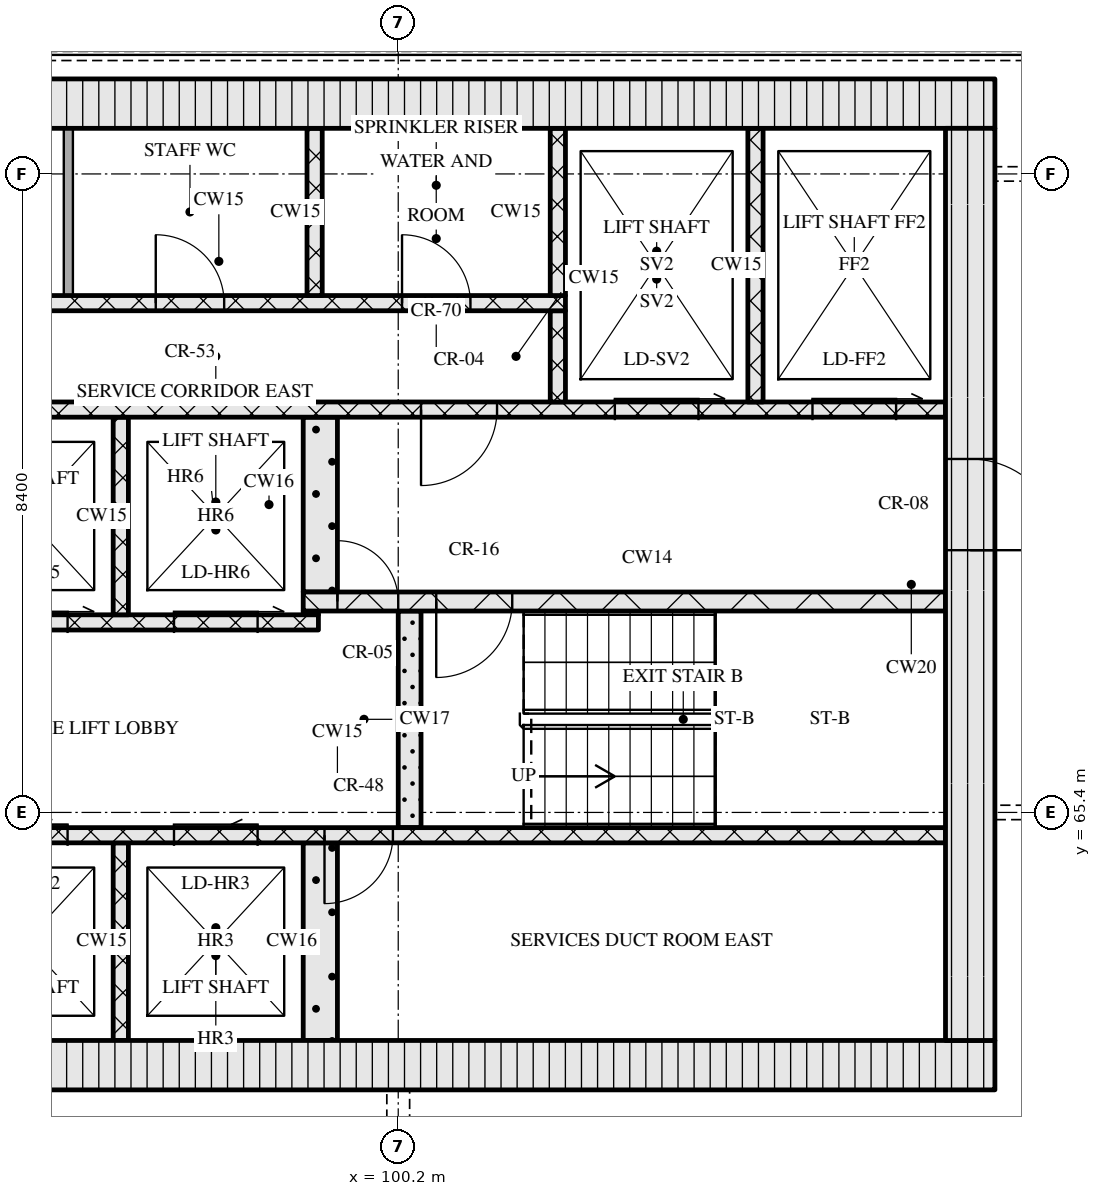
"""IFC4 building model, lengths in metres.
Left out: names, types, materials, properties, quantities, classifications, styles, units other than length and angle.
Written with IfcOpenShell. Run it as: python <this file> out.ifc"""

import sys

from ifc_helpers import new_model, si_unit, direction, frame, frame_2d, origin, place, context, subcontext, project, spatial, rectangle, extrude, element, fill, save


model = new_model("IFC4")
c1 = context("Model", 3, precision=1e-05, world=origin(), true_north=direction((0.0, 1.0)))
c2 = subcontext(c1, "Body", "Model", "MODEL_VIEW")
j1 = project(units=[si_unit("LENGTHUNIT", "METRE"), si_unit("PLANEANGLEUNIT", "RADIAN")], contexts=[c1])
p1 = place(None, origin())
s1 = spatial("IfcSite", under=j1, at=p1, CompositionType="ELEMENT")
p2 = place(p1, origin())
s2 = spatial("IfcBuilding", under=s1, at=p2, CompositionType="ELEMENT")
p3 = place(p2, frame((0.0, 0.0, 209.1)))
s3 = spatial("IfcBuildingStorey", under=s2, at=p3, CompositionType="ELEMENT", Elevation=209.1)
p4 = place(p3, frame((67.15, 62.075, 0.0), z_axis=(0.0, 0.0, 1.0), x_axis=(1.0, 0.0, 0.0)))
e1 = element("IfcWall", 1, at=p4, inside=s3, PredefinedType="SOLIDWALL", context=c2, shape_type="SweptSolid", body=[
    extrude(rectangle(XDim=40.9, YDim=0.65, at=frame_2d((20.45, 0.0))), origin(), (0.0, 0.0, 1.0), 3.32),
])
p5 = place(p4, frame((20.8, 0.0, 0.0)))
e2 = element("IfcOpeningElement", 2, at=p5, cuts=e1, PredefinedType="OPENING", context=c2, shape_type="SweptSolid", body=[
    extrude(rectangle(XDim=1.8, YDim=2.1, at=frame_2d((0.9, 1.05))), frame((0.0, 0.335, 0.0), z_axis=(0.0, -1.0, 0.0), x_axis=(1.0, 0.0, 0.0)), (0.0, 0.0, 1.0), 0.67),
])
p6 = place(p3, frame((67.15, 74.725, 0.0), z_axis=(0.0, 0.0, 1.0), x_axis=(1.0, 0.0, 0.0)))
e3 = element("IfcWall", 3, at=p6, inside=s3, PredefinedType="SOLIDWALL", context=c2, shape_type="SweptSolid", body=[
    extrude(rectangle(XDim=40.9, YDim=0.65, at=frame_2d((20.45, 0.0))), origin(), (0.0, 0.0, 1.0), 3.32),
])
p7 = place(p3, frame((107.725, 62.4, 0.0), z_axis=(0.0, 0.0, 1.0), x_axis=(0.0, 1.0, 0.0)))
e4 = element("IfcWall", 4, at=p7, inside=s3, PredefinedType="SOLIDWALL", context=c2, shape_type="SweptSolid", body=[
    extrude(rectangle(XDim=12.0, YDim=0.65, at=frame_2d((6.0, 0.0))), origin(), (0.0, 0.0, 1.0), 3.32),
])
p8 = place(p7, frame((6.45, 0.0, 0.0)))
e5 = element("IfcOpeningElement", 5, at=p8, cuts=e4, PredefinedType="OPENING", context=c2, shape_type="SweptSolid", body=[
    extrude(rectangle(XDim=1.2, YDim=2.1, at=frame_2d((0.6, 1.05))), frame((0.0, 0.335, 0.0), z_axis=(0.0, -1.0, 0.0), x_axis=(1.0, 0.0, 0.0)), (0.0, 0.0, 1.0), 0.67),
])
p9 = place(p3, frame((96.55, 62.4, 0.0), z_axis=(0.0, 0.0, 1.0), x_axis=(0.0, 1.0, 0.0)))
e6 = element("IfcWall", 6, at=p9, inside=s3, PredefinedType="SOLIDWALL", context=c2, shape_type="SweptSolid", body=[
    extrude(rectangle(XDim=2.6, YDim=0.2, at=frame_2d((1.3, 0.0))), origin(), (0.0, 0.0, 1.0), 3.32),
])
p10 = place(p3, frame((99.175, 62.4, 0.0), z_axis=(0.0, 0.0, 1.0), x_axis=(0.0, 1.0, 0.0)))
e7 = element("IfcWall", 7, at=p10, inside=s3, PredefinedType="SOLIDWALL", context=c2, shape_type="SweptSolid", body=[
    extrude(rectangle(XDim=2.6, YDim=0.45, at=frame_2d((1.3, 0.0))), origin(), (0.0, 0.0, 1.0), 3.32),
])
p11 = place(p3, frame((91.4, 65.1, 0.0), z_axis=(0.0, 0.0, 1.0), x_axis=(1.0, 0.0, 0.0)))
e8 = element("IfcWall", 8, at=p11, inside=s3, PredefinedType="SOLIDWALL", context=c2, shape_type="SweptSolid", body=[
    extrude(rectangle(XDim=16.0, YDim=0.2, at=frame_2d((8.0, 0.0))), origin(), (0.0, 0.0, 1.0), 3.32),
])
p12 = place(p11, frame((0.85, 0.0, 0.0)))
e9 = element("IfcOpeningElement", 9, at=p12, cuts=e8, PredefinedType="OPENING", context=c2, shape_type="SweptSolid", body=[
    extrude(rectangle(XDim=1.1, YDim=2.1, at=frame_2d((0.55, 1.05))), frame((0.0, 0.11, 0.0), z_axis=(0.0, -1.0, 0.0), x_axis=(1.0, 0.0, 0.0)), (0.0, 0.0, 1.0), 0.22),
])
p13 = place(p11, frame((3.35, 0.0, 0.0)))
e10 = element("IfcOpeningElement", 10, at=p13, cuts=e8, PredefinedType="OPENING", context=c2, shape_type="SweptSolid", body=[
    extrude(rectangle(XDim=1.1, YDim=2.1, at=frame_2d((0.55, 1.05))), frame((0.0, 0.11, 0.0), z_axis=(0.0, -1.0, 0.0), x_axis=(1.0, 0.0, 0.0)), (0.0, 0.0, 1.0), 0.22),
])
p14 = place(p11, frame((5.85, 0.0, 0.0)))
e11 = element("IfcOpeningElement", 11, at=p14, cuts=e8, PredefinedType="OPENING", context=c2, shape_type="SweptSolid", body=[
    extrude(rectangle(XDim=1.1, YDim=2.1, at=frame_2d((0.55, 1.05))), frame((0.0, 0.11, 0.0), z_axis=(0.0, -1.0, 0.0), x_axis=(1.0, 0.0, 0.0)), (0.0, 0.0, 1.0), 0.22),
])
p15 = place(p11, frame((7.83, 0.0, 0.0)))
e12 = element("IfcOpeningElement", 12, at=p15, cuts=e8, PredefinedType="OPENING", context=c2, shape_type="SweptSolid", body=[
    extrude(rectangle(XDim=0.9, YDim=2.1, at=frame_2d((0.45, 1.05))), frame((0.0, 0.11, 0.0), z_axis=(0.0, -1.0, 0.0), x_axis=(1.0, 0.0, 0.0)), (0.0, 0.0, 1.0), 0.22),
])
p16 = place(p3, frame((100.35, 65.2, 0.0), z_axis=(0.0, 0.0, 1.0), x_axis=(0.0, 1.0, 0.0)))
e13 = element("IfcWall", 13, at=p16, inside=s3, PredefinedType="SOLIDWALL", context=c2, shape_type="SweptSolid", body=[
    extrude(rectangle(XDim=2.85, YDim=0.3, at=frame_2d((1.425, 0.0))), origin(), (0.0, 0.0, 1.0), 3.32),
])
p17 = place(p3, frame((76.05, 67.9, 0.0), z_axis=(0.0, 0.0, 1.0), x_axis=(1.0, 0.0, 0.0)))
e14 = element("IfcWall", 14, at=p17, inside=s3, PredefinedType="SOLIDWALL", context=c2, shape_type="SweptSolid", body=[
    extrude(rectangle(XDim=23.1, YDim=0.2, at=frame_2d((11.55, 0.0))), origin(), (0.0, 0.0, 1.0), 3.32),
])
p18 = place(p17, frame((1.4, 0.0, 0.0)))
e15 = element("IfcOpeningElement", 15, at=p18, cuts=e14, PredefinedType="OPENING", context=c2, shape_type="SweptSolid", body=[
    extrude(rectangle(XDim=0.9, YDim=2.1, at=frame_2d((0.45, 1.05))), frame((0.0, 0.11, 0.0), z_axis=(0.0, -1.0, 0.0), x_axis=(1.0, 0.0, 0.0)), (0.0, 0.0, 1.0), 0.22),
])
p19 = place(p17, frame((5.11, 0.0, 0.0)))
e16 = element("IfcOpeningElement", 16, at=p19, cuts=e14, PredefinedType="OPENING", context=c2, shape_type="SweptSolid", body=[
    extrude(rectangle(XDim=0.9, YDim=2.1, at=frame_2d((0.45, 1.05))), frame((0.0, 0.11, 0.0), z_axis=(0.0, -1.0, 0.0), x_axis=(1.0, 0.0, 0.0)), (0.0, 0.0, 1.0), 0.22),
])
p20 = place(p17, frame((8.45, 0.0, 0.0)))
e17 = element("IfcOpeningElement", 17, at=p20, cuts=e14, PredefinedType="OPENING", context=c2, shape_type="SweptSolid", body=[
    extrude(rectangle(XDim=0.9, YDim=2.1, at=frame_2d((0.45, 1.05))), frame((0.0, 0.11, 0.0), z_axis=(0.0, -1.0, 0.0), x_axis=(1.0, 0.0, 0.0)), (0.0, 0.0, 1.0), 0.22),
])
p21 = place(p17, frame((10.91, 0.0, 0.0)))
e18 = element("IfcOpeningElement", 18, at=p21, cuts=e14, PredefinedType="OPENING", context=c2, shape_type="SweptSolid", body=[
    extrude(rectangle(XDim=0.9, YDim=2.1, at=frame_2d((0.45, 1.05))), frame((0.0, 0.11, 0.0), z_axis=(0.0, -1.0, 0.0), x_axis=(1.0, 0.0, 0.0)), (0.0, 0.0, 1.0), 0.22),
])
p22 = place(p17, frame((13.55, 0.0, 0.0)))
e19 = element("IfcOpeningElement", 19, at=p22, cuts=e14, PredefinedType="OPENING", context=c2, shape_type="SweptSolid", body=[
    extrude(rectangle(XDim=1.0, YDim=2.1, at=frame_2d((0.5, 1.05))), frame((0.0, 0.11, 0.0), z_axis=(0.0, -1.0, 0.0), x_axis=(1.0, 0.0, 0.0)), (0.0, 0.0, 1.0), 0.22),
])
p23 = place(p17, frame((16.2, 0.0, 0.0)))
e20 = element("IfcOpeningElement", 20, at=p23, cuts=e14, PredefinedType="OPENING", context=c2, shape_type="SweptSolid", body=[
    extrude(rectangle(XDim=1.1, YDim=2.1, at=frame_2d((0.55, 1.05))), frame((0.0, 0.11, 0.0), z_axis=(0.0, -1.0, 0.0), x_axis=(1.0, 0.0, 0.0)), (0.0, 0.0, 1.0), 0.22),
])
p24 = place(p17, frame((18.7, 0.0, 0.0)))
e21 = element("IfcOpeningElement", 21, at=p24, cuts=e14, PredefinedType="OPENING", context=c2, shape_type="SweptSolid", body=[
    extrude(rectangle(XDim=1.1, YDim=2.1, at=frame_2d((0.55, 1.05))), frame((0.0, 0.11, 0.0), z_axis=(0.0, -1.0, 0.0), x_axis=(1.0, 0.0, 0.0)), (0.0, 0.0, 1.0), 0.22),
])
p25 = place(p17, frame((21.2, 0.0, 0.0)))
e22 = element("IfcOpeningElement", 22, at=p25, cuts=e14, PredefinedType="OPENING", context=c2, shape_type="SweptSolid", body=[
    extrude(rectangle(XDim=1.1, YDim=2.1, at=frame_2d((0.55, 1.05))), frame((0.0, 0.11, 0.0), z_axis=(0.0, -1.0, 0.0), x_axis=(1.0, 0.0, 0.0)), (0.0, 0.0, 1.0), 0.22),
])
p26 = place(p3, frame((96.55, 68.0, 0.0), z_axis=(0.0, 0.0, 1.0), x_axis=(0.0, 1.0, 0.0)))
e23 = element("IfcWall", 23, at=p26, inside=s3, PredefinedType="SOLIDWALL", context=c2, shape_type="SweptSolid", body=[
    extrude(rectangle(XDim=2.6, YDim=0.2, at=frame_2d((1.3, 0.0))), origin(), (0.0, 0.0, 1.0), 3.32),
])
p27 = place(p3, frame((98.95, 68.025, 0.0), z_axis=(0.0, 0.0, 1.0), x_axis=(1.0, 0.0, 0.0)))
e24 = element("IfcWall", 24, at=p27, inside=s3, PredefinedType="SOLIDWALL", context=c2, shape_type="SweptSolid", body=[
    extrude(rectangle(XDim=0.2, YDim=0.05, at=frame_2d((0.1, 0.0))), origin(), (0.0, 0.0, 1.0), 3.32),
])
p28 = place(p3, frame((98.95, 68.175, 0.0), z_axis=(0.0, 0.0, 1.0), x_axis=(1.0, 0.0, 0.0)))
e25 = element("IfcWall", 25, at=p28, inside=s3, PredefinedType="SOLIDWALL", context=c2, shape_type="SweptSolid", body=[
    extrude(rectangle(XDim=8.45, YDim=0.25, at=frame_2d((4.225, 0.0))), origin(), (0.0, 0.0, 1.0), 3.32),
])
p29 = place(p28, frame((0.45, 0.0, 0.0)))
e26 = element("IfcOpeningElement", 26, at=p29, cuts=e25, PredefinedType="OPENING", context=c2, shape_type="SweptSolid", body=[
    extrude(rectangle(XDim=0.8, YDim=2.1, at=frame_2d((0.4, 1.05))), frame((0.0, 0.135, 0.0), z_axis=(0.0, -1.0, 0.0), x_axis=(1.0, 0.0, 0.0)), (0.0, 0.0, 1.0), 0.27),
])
p30 = place(p28, frame((1.75, 0.0, 0.0)))
e27 = element("IfcOpeningElement", 27, at=p30, cuts=e25, PredefinedType="OPENING", context=c2, shape_type="SweptSolid", body=[
    extrude(rectangle(XDim=1.0, YDim=2.1, at=frame_2d((0.5, 1.05))), frame((0.0, 0.135, 0.0), z_axis=(0.0, -1.0, 0.0), x_axis=(1.0, 0.0, 0.0)), (0.0, 0.0, 1.0), 0.27),
])
p31 = place(p3, frame((99.175, 68.3, 0.0), z_axis=(0.0, 0.0, 1.0), x_axis=(0.0, 1.0, 0.0)))
e28 = element("IfcWall", 28, at=p31, inside=s3, PredefinedType="SOLIDWALL", context=c2, shape_type="SweptSolid", body=[
    extrude(rectangle(XDim=2.3, YDim=0.45, at=frame_2d((1.15, 0.0))), origin(), (0.0, 0.0, 1.0), 3.32),
])
p32 = place(p3, frame((67.8, 70.7, 0.0), z_axis=(0.0, 0.0, 1.0), x_axis=(1.0, 0.0, 0.0)))
e29 = element("IfcWall", 29, at=p32, inside=s3, PredefinedType="SOLIDWALL", context=c2, shape_type="SweptSolid", body=[
    extrude(rectangle(XDim=39.6, YDim=0.2, at=frame_2d((19.8, 0.0))), origin(), (0.0, 0.0, 1.0), 3.32),
])
p33 = place(p32, frame((0.65, 0.0, 0.0)))
e30 = element("IfcOpeningElement", 30, at=p33, cuts=e29, PredefinedType="OPENING", context=c2, shape_type="SweptSolid", body=[
    extrude(rectangle(XDim=1.1, YDim=2.1, at=frame_2d((0.55, 1.05))), frame((0.0, 0.11, 0.0), z_axis=(0.0, -1.0, 0.0), x_axis=(1.0, 0.0, 0.0)), (0.0, 0.0, 1.0), 0.22),
])
p34 = place(p32, frame((3.25, 0.0, 0.0)))
e31 = element("IfcOpeningElement", 31, at=p34, cuts=e29, PredefinedType="OPENING", context=c2, shape_type="SweptSolid", body=[
    extrude(rectangle(XDim=1.1, YDim=2.1, at=frame_2d((0.55, 1.05))), frame((0.0, 0.11, 0.0), z_axis=(0.0, -1.0, 0.0), x_axis=(1.0, 0.0, 0.0)), (0.0, 0.0, 1.0), 0.22),
])
p35 = place(p32, frame((5.9, 0.0, 0.0)))
e32 = element("IfcOpeningElement", 32, at=p35, cuts=e29, PredefinedType="OPENING", context=c2, shape_type="SweptSolid", body=[
    extrude(rectangle(XDim=1.0, YDim=2.1, at=frame_2d((0.5, 1.05))), frame((0.0, 0.11, 0.0), z_axis=(0.0, -1.0, 0.0), x_axis=(1.0, 0.0, 0.0)), (0.0, 0.0, 1.0), 0.22),
])
p36 = place(p32, frame((21.7, 0.0, 0.0)))
e33 = element("IfcOpeningElement", 33, at=p36, cuts=e29, PredefinedType="OPENING", context=c2, shape_type="SweptSolid", body=[
    extrude(rectangle(XDim=1.0, YDim=2.1, at=frame_2d((0.5, 1.05))), frame((0.0, 0.11, 0.0), z_axis=(0.0, -1.0, 0.0), x_axis=(1.0, 0.0, 0.0)), (0.0, 0.0, 1.0), 0.22),
])
p37 = place(p32, frame((32.7, 0.0, 0.0)))
e34 = element("IfcOpeningElement", 34, at=p37, cuts=e29, PredefinedType="OPENING", context=c2, shape_type="SweptSolid", body=[
    extrude(rectangle(XDim=1.0, YDim=2.1, at=frame_2d((0.5, 1.05))), frame((0.0, 0.11, 0.0), z_axis=(0.0, -1.0, 0.0), x_axis=(1.0, 0.0, 0.0)), (0.0, 0.0, 1.0), 0.22),
])
p38 = place(p32, frame((35.25, 0.0, 0.0)))
e35 = element("IfcOpeningElement", 35, at=p38, cuts=e29, PredefinedType="OPENING", context=c2, shape_type="SweptSolid", body=[
    extrude(rectangle(XDim=1.1, YDim=2.1, at=frame_2d((0.55, 1.05))), frame((0.0, 0.11, 0.0), z_axis=(0.0, -1.0, 0.0), x_axis=(1.0, 0.0, 0.0)), (0.0, 0.0, 1.0), 0.22),
])
p39 = place(p32, frame((37.85, 0.0, 0.0)))
e36 = element("IfcOpeningElement", 36, at=p39, cuts=e29, PredefinedType="OPENING", context=c2, shape_type="SweptSolid", body=[
    extrude(rectangle(XDim=1.1, YDim=2.1, at=frame_2d((0.55, 1.05))), frame((0.0, 0.11, 0.0), z_axis=(0.0, -1.0, 0.0), x_axis=(1.0, 0.0, 0.0)), (0.0, 0.0, 1.0), 0.22),
])
p40 = place(p3, frame((102.3, 70.8, 0.0), z_axis=(0.0, 0.0, 1.0), x_axis=(0.0, 1.0, 0.0)))
e37 = element("IfcWall", 37, at=p40, inside=s3, PredefinedType="SOLIDWALL", context=c2, shape_type="SweptSolid", body=[
    extrude(rectangle(XDim=1.2, YDim=0.2, at=frame_2d((0.6, 0.0))), origin(), (0.0, 0.0, 1.0), 3.32),
])
p41 = place(p3, frame((104.9, 70.8, 0.0), z_axis=(0.0, 0.0, 1.0), x_axis=(0.0, 1.0, 0.0)))
e38 = element("IfcWall", 38, at=p41, inside=s3, PredefinedType="SOLIDWALL", context=c2, shape_type="SweptSolid", body=[
    extrude(rectangle(XDim=3.6, YDim=0.2, at=frame_2d((1.8, 0.0))), origin(), (0.0, 0.0, 1.0), 3.32),
])
p42 = place(p3, frame((93.28, 72.1, 0.0), z_axis=(0.0, 0.0, 1.0), x_axis=(1.0, 0.0, 0.0)))
e39 = element("IfcWall", 39, at=p42, inside=s3, PredefinedType="SOLIDWALL", context=c2, shape_type="SweptSolid", body=[
    extrude(rectangle(XDim=9.12, YDim=0.2, at=frame_2d((4.56, 0.0))), origin(), (0.0, 0.0, 1.0), 3.32),
])
p43 = place(p42, frame((0.87, 0.0, 0.0)))
e40 = element("IfcOpeningElement", 40, at=p43, cuts=e39, PredefinedType="OPENING", context=c2, shape_type="SweptSolid", body=[
    extrude(rectangle(XDim=0.9, YDim=2.1, at=frame_2d((0.45, 1.05))), frame((0.0, 0.11, 0.0), z_axis=(0.0, -1.0, 0.0), x_axis=(1.0, 0.0, 0.0)), (0.0, 0.0, 1.0), 0.22),
])
p44 = place(p42, frame((3.73, 0.0, 0.0)))
e41 = element("IfcOpeningElement", 41, at=p44, cuts=e39, PredefinedType="OPENING", context=c2, shape_type="SweptSolid", body=[
    extrude(rectangle(XDim=0.9, YDim=2.1, at=frame_2d((0.45, 1.05))), frame((0.0, 0.11, 0.0), z_axis=(0.0, -1.0, 0.0), x_axis=(1.0, 0.0, 0.0)), (0.0, 0.0, 1.0), 0.22),
])
p45 = place(p42, frame((6.97, 0.0, 0.0)))
e42 = element("IfcOpeningElement", 42, at=p45, cuts=e39, PredefinedType="OPENING", context=c2, shape_type="SweptSolid", body=[
    extrude(rectangle(XDim=0.9, YDim=2.1, at=frame_2d((0.45, 1.05))), frame((0.0, 0.11, 0.0), z_axis=(0.0, -1.0, 0.0), x_axis=(1.0, 0.0, 0.0)), (0.0, 0.0, 1.0), 0.22),
])
p46 = place(p3, frame((95.86, 72.2, 0.0), z_axis=(0.0, 0.0, 1.0), x_axis=(0.0, 1.0, 0.0)))
e43 = element("IfcWall", 43, at=p46, inside=s3, PredefinedType="PARTITIONING", context=c2, shape_type="SweptSolid", body=[
    extrude(rectangle(XDim=2.2, YDim=0.12, at=frame_2d((1.1, 0.0))), origin(), (0.0, 0.0, 1.0), 3.32),
])
for number, where, z_axis, x_axis in (
    (44, (99.1, 72.2, 0.0), (0.0, 0.0, 1.0), (0.0, 1.0, 0.0)),
    (45, (102.3, 72.2, 0.0), (0.0, 0.0, 1.0), (0.0, 1.0, 0.0)),
):
    element("IfcWall", number, at=place(p3, frame(where, z_axis=z_axis, x_axis=x_axis)), inside=s3, PredefinedType="SOLIDWALL", context=c2, shape_type="SweptSolid", body=[
        extrude(rectangle(XDim=2.2, YDim=0.2, at=frame_2d((1.1, 0.0))), origin(), (0.0, 0.0, 1.0), 3.32),
    ])
p47 = place(p13, origin())
e46 = element("IfcDoor", 46, at=p47, inside=s3, OperationType="SLIDING_TO_LEFT", PredefinedType="DOOR", context=c2, shape_type="SweptSolid", body=[
    extrude(rectangle(XDim=1.1, YDim=2.1, at=frame_2d((0.55, 1.05))), frame((0.0, 0.025, 0.0), z_axis=(0.0, -1.0, 0.0), x_axis=(1.0, 0.0, 0.0)), (0.0, 0.0, 1.0), 0.05),
])
fill(e10, e46)
p48 = place(p14, origin())
e47 = element("IfcDoor", 47, at=p48, inside=s3, OperationType="SLIDING_TO_LEFT", PredefinedType="DOOR", context=c2, shape_type="SweptSolid", body=[
    extrude(rectangle(XDim=1.1, YDim=2.1, at=frame_2d((0.55, 1.05))), frame((0.0, 0.025, 0.0), z_axis=(0.0, -1.0, 0.0), x_axis=(1.0, 0.0, 0.0)), (0.0, 0.0, 1.0), 0.05),
])
fill(e11, e47)
p49 = place(p15, origin())
e48 = element("IfcDoor", 48, at=p49, inside=s3, OperationType="SINGLE_SWING_RIGHT", PredefinedType="DOOR", context=c2, shape_type="SweptSolid", body=[
    extrude(rectangle(XDim=0.9, YDim=2.1, at=frame_2d((0.45, 1.05))), frame((0.0, 0.025, 0.0), z_axis=(0.0, -1.0, 0.0), x_axis=(1.0, 0.0, 0.0)), (0.0, 0.0, 1.0), 0.05),
])
fill(e12, e48)
p50 = place(p24, origin())
e49 = element("IfcDoor", 49, at=p50, inside=s3, OperationType="SLIDING_TO_RIGHT", PredefinedType="DOOR", context=c2, shape_type="SweptSolid", body=[
    extrude(rectangle(XDim=1.1, YDim=2.1, at=frame_2d((0.55, 1.05))), frame((0.0, 0.025, 0.0), z_axis=(0.0, -1.0, 0.0), x_axis=(1.0, 0.0, 0.0)), (0.0, 0.0, 1.0), 0.05),
])
fill(e21, e49)
p51 = place(p25, origin())
e50 = element("IfcDoor", 50, at=p51, inside=s3, OperationType="SLIDING_TO_RIGHT", PredefinedType="DOOR", context=c2, shape_type="SweptSolid", body=[
    extrude(rectangle(XDim=1.1, YDim=2.1, at=frame_2d((0.55, 1.05))), frame((0.0, 0.025, 0.0), z_axis=(0.0, -1.0, 0.0), x_axis=(1.0, 0.0, 0.0)), (0.0, 0.0, 1.0), 0.05),
])
fill(e22, e50)
p52 = place(p29, origin())
e51 = element("IfcDoor", 51, at=p52, inside=s3, OperationType="SINGLE_SWING_LEFT", PredefinedType="DOOR", context=c2, shape_type="SweptSolid", body=[
    extrude(rectangle(XDim=0.8, YDim=2.1, at=frame_2d((0.4, 1.05))), frame((0.0, 0.025, 0.0), z_axis=(0.0, -1.0, 0.0), x_axis=(1.0, 0.0, 0.0)), (0.0, 0.0, 1.0), 0.05),
])
fill(e26, e51)
p53 = place(p30, origin())
e52 = element("IfcDoor", 52, at=p53, inside=s3, OperationType="SINGLE_SWING_RIGHT", PredefinedType="DOOR", context=c2, shape_type="SweptSolid", body=[
    extrude(rectangle(XDim=1.0, YDim=2.1, at=frame_2d((0.5, 1.05))), frame((0.0, 0.025, 0.0), z_axis=(0.0, -1.0, 0.0), x_axis=(1.0, 0.0, 0.0)), (0.0, 0.0, 1.0), 0.05),
])
fill(e27, e52)
p54 = place(p8, origin())
e53 = element("IfcDoor", 53, at=p54, inside=s3, OperationType="SINGLE_SWING_RIGHT", PredefinedType="DOOR", context=c2, shape_type="SweptSolid", body=[
    extrude(rectangle(XDim=1.2, YDim=2.1, at=frame_2d((0.6, 1.05))), frame((0.0, 0.025, 0.0), z_axis=(0.0, -1.0, 0.0), x_axis=(1.0, 0.0, 0.0)), (0.0, 0.0, 1.0), 0.05),
])
fill(e5, e53)
p55 = place(p37, origin())
e54 = element("IfcDoor", 54, at=p55, inside=s3, OperationType="SINGLE_SWING_RIGHT", PredefinedType="DOOR", context=c2, shape_type="SweptSolid", body=[
    extrude(rectangle(XDim=1.0, YDim=2.1, at=frame_2d((0.5, 1.05))), frame((0.0, 0.025, 0.0), z_axis=(0.0, -1.0, 0.0), x_axis=(1.0, 0.0, 0.0)), (0.0, 0.0, 1.0), 0.05),
])
fill(e34, e54)
p56 = place(p38, origin())
e55 = element("IfcDoor", 55, at=p56, inside=s3, OperationType="SLIDING_TO_RIGHT", PredefinedType="DOOR", context=c2, shape_type="SweptSolid", body=[
    extrude(rectangle(XDim=1.1, YDim=2.1, at=frame_2d((0.55, 1.05))), frame((0.0, 0.025, 0.0), z_axis=(0.0, -1.0, 0.0), x_axis=(1.0, 0.0, 0.0)), (0.0, 0.0, 1.0), 0.05),
])
fill(e35, e55)
p57 = place(p39, origin())
e56 = element("IfcDoor", 56, at=p57, inside=s3, OperationType="SLIDING_TO_RIGHT", PredefinedType="DOOR", context=c2, shape_type="SweptSolid", body=[
    extrude(rectangle(XDim=1.1, YDim=2.1, at=frame_2d((0.55, 1.05))), frame((0.0, 0.025, 0.0), z_axis=(0.0, -1.0, 0.0), x_axis=(1.0, 0.0, 0.0)), (0.0, 0.0, 1.0), 0.05),
])
fill(e36, e56)
p58 = place(p44, origin())
e57 = element("IfcDoor", 57, at=p58, inside=s3, OperationType="SINGLE_SWING_LEFT", PredefinedType="DOOR", context=c2, shape_type="SweptSolid", body=[
    extrude(rectangle(XDim=0.9, YDim=2.1, at=frame_2d((0.45, 1.05))), frame((0.0, 0.025, 0.0), z_axis=(0.0, -1.0, 0.0), x_axis=(1.0, 0.0, 0.0)), (0.0, 0.0, 1.0), 0.05),
])
fill(e41, e57)
p59 = place(p45, origin())
e58 = element("IfcDoor", 58, at=p59, inside=s3, OperationType="SINGLE_SWING_LEFT", PredefinedType="DOOR", context=c2, shape_type="SweptSolid", body=[
    extrude(rectangle(XDim=0.9, YDim=2.1, at=frame_2d((0.45, 1.05))), frame((0.0, 0.025, 0.0), z_axis=(0.0, -1.0, 0.0), x_axis=(1.0, 0.0, 0.0)), (0.0, 0.0, 1.0), 0.05),
])
fill(e42, e58)
save(model, sys.argv[1])
